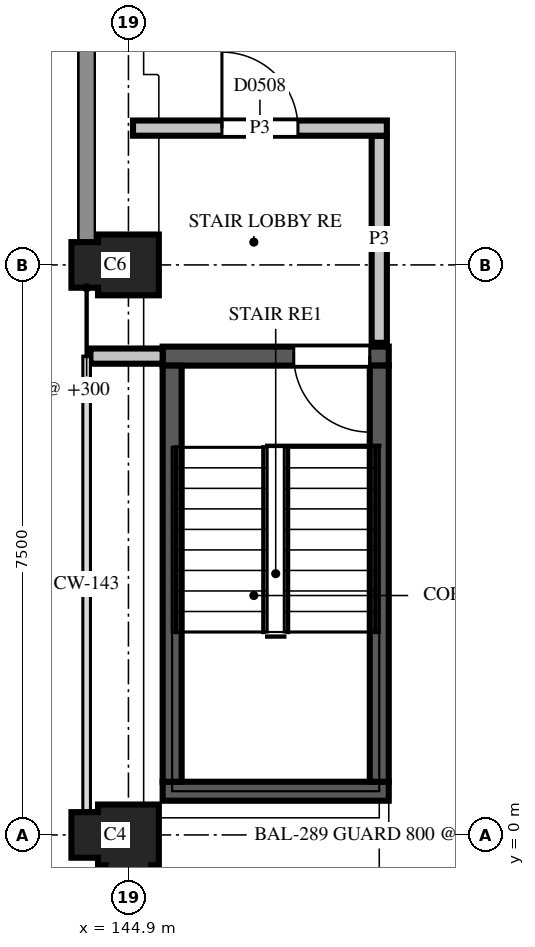
"""IFC4 building model, lengths in metres.
Left out: names, types, materials, properties, quantities, classifications, styles, units other than length and angle.
Written with IfcOpenShell. Run it as: python <this file> out.ifc"""

import sys

from ifc_helpers import new_model, si_unit, direction, frame, frame_2d, origin, place, context, subcontext, project, spatial, polyline, rectangle, outline, extrude, element, fill, save


model = new_model("IFC4")
c1 = context("Model", 3, precision=1e-05, world=origin(), true_north=direction((0.0, 1.0)))
c2 = subcontext(c1, "Body", "Model", "MODEL_VIEW")
j1 = project(units=[si_unit("LENGTHUNIT", "METRE"), si_unit("PLANEANGLEUNIT", "RADIAN")], contexts=[c1])
p1 = place(None, origin())
s1 = spatial("IfcSite", under=j1, at=p1, CompositionType="ELEMENT")
p2 = place(p1, origin())
s2 = spatial("IfcBuilding", under=s1, at=p2, CompositionType="ELEMENT")
p3 = place(p2, frame((0.0, 0.0, 19.3)))
s3 = spatial("IfcBuildingStorey", under=s2, at=p3, CompositionType="ELEMENT", Elevation=19.3)
p4 = place(p3, frame((144.9, 0.0, 0.0), z_axis=(0.0, 0.0, 1.0), x_axis=(-1.0, 0.0, 0.0)))
e1 = element("IfcColumn", 1, at=p4, inside=s3, PredefinedType="COLUMN", context=c2, shape_type="SweptSolid", body=[
    extrude(outline(polyline([(-0.4, -0.4), (0.4, -0.4), (0.4, -0.3), (0.75, -0.3), (0.75, 0.3), (0.4, 0.3), (0.4, 0.4), (0.3, 0.4), (0.3, 0.75), (-0.3, 0.75), (-0.3, 0.4), (-0.4, 0.4), (-0.4, -0.4)])), origin(), (0.0, 0.0, 1.0), 3.7),
])
p5 = place(p3, frame((144.9, 7.5, 0.0), z_axis=(0.0, 0.0, 1.0), x_axis=(-1.0, 0.0, 0.0)))
e2 = element("IfcColumn", 2, at=p5, inside=s3, PredefinedType="COLUMN", context=c2, shape_type="SweptSolid", body=[
    extrude(outline(polyline([(-0.4, -0.4), (0.4, -0.4), (0.4, -0.3), (0.75, -0.3), (0.75, 0.3), (0.4, 0.3), (0.4, 0.4), (-0.4, 0.4), (-0.4, -0.4)])), origin(), (0.0, 0.0, 1.0), 3.7),
])
p6 = place(p3, frame((145.35, 0.575, 0.0), z_axis=(0.0, 0.0, 1.0), x_axis=(1.0, 0.0, 0.0)))
e3 = element("IfcWall", 3, at=p6, inside=s3, PredefinedType="SHEAR", context=c2, shape_type="SweptSolid", body=[
    extrude(rectangle(XDim=2.975, YDim=0.25, at=frame_2d((1.487, 0.0))), origin(), (0.0, 0.0, 1.0), 3.7),
])
p7 = place(p3, frame((145.35, 6.3, 0.0), z_axis=(0.0, 0.0, 1.0), x_axis=(1.0, 0.0, 0.0)))
e4 = element("IfcWall", 4, at=p7, inside=s3, PredefinedType="SHEAR", context=c2, shape_type="SweptSolid", body=[
    extrude(rectangle(XDim=2.975, YDim=0.25, at=frame_2d((1.487, 0.0))), origin(), (0.0, 0.0, 1.0), 3.7),
])
p8 = place(p7, frame((1.725, 0.0, 0.0)))
e5 = element("IfcOpeningElement", 5, at=p8, cuts=e4, PredefinedType="OPENING", context=c2, shape_type="SweptSolid", body=[
    extrude(rectangle(XDim=1.0, YDim=2.1, at=frame_2d((0.5, 1.05))), frame((0.0, 0.135, 0.0), z_axis=(0.0, -1.0, 0.0), x_axis=(1.0, 0.0, 0.0)), (0.0, 0.0, 1.0), 0.27),
])
for number, where, z_axis, x_axis in (
    (6, (145.475, 0.7, 0.0), (0.0, 0.0, 1.0), (0.0, 1.0, 0.0)),
    (7, (148.2, 0.7, 0.0), (0.0, 0.0, 1.0), (0.0, 1.0, 0.0)),
):
    element("IfcWall", number, at=place(p3, frame(where, z_axis=z_axis, x_axis=x_axis)), inside=s3, PredefinedType="SHEAR", context=c2, shape_type="SweptSolid", body=[
        extrude(rectangle(XDim=5.475, YDim=0.25, at=frame_2d((2.738, 0.0))), origin(), (0.0, 0.0, 1.0), 3.7),
    ])
p9 = place(p3, frame((144.4, 6.3, 0.0), z_axis=(0.0, 0.0, 1.0), x_axis=(1.0, 0.0, 0.0)))
e8 = element("IfcWall", 8, at=p9, inside=s3, PredefinedType="PARTITIONING", context=c2, shape_type="SweptSolid", body=[
    extrude(rectangle(XDim=0.95, YDim=0.2, at=frame_2d((0.475, 0.0))), origin(), (0.0, 0.0, 1.0), 2.88),
])
p10 = place(p3, frame((148.2, 6.475, 0.0), z_axis=(0.0, 0.0, 1.0), x_axis=(0.0, 1.0, 0.0)))
e9 = element("IfcWall", 9, at=p10, inside=s3, PredefinedType="PARTITIONING", context=c2, shape_type="SweptSolid", body=[
    extrude(rectangle(XDim=2.725, YDim=0.2, at=frame_2d((1.362, 0.0))), origin(), (0.0, 0.0, 1.0), 2.88),
])
p11 = place(p3, frame((148.3, 9.3, 0.0), z_axis=(0.0, 0.0, 1.0), x_axis=(-1.0, 0.0, 0.0)))
e10 = element("IfcWall", 10, at=p11, inside=s3, PredefinedType="PARTITIONING", context=c2, shape_type="SweptSolid", body=[
    extrude(rectangle(XDim=3.34, YDim=0.2, at=frame_2d((1.67, 0.0))), origin(), (0.0, 0.0, 1.0), 2.88),
])
p12 = place(p11, frame((1.17, 0.0, 0.0)))
e11 = element("IfcOpeningElement", 11, at=p12, cuts=e10, PredefinedType="OPENING", context=c2, shape_type="SweptSolid", body=[
    extrude(rectangle(XDim=1.0, YDim=2.1, at=frame_2d((0.5, 1.05))), frame((0.0, 0.11, 0.0), z_axis=(0.0, -1.0, 0.0), x_axis=(1.0, 0.0, 0.0)), (0.0, 0.0, 1.0), 0.22),
])
p13 = place(p12, origin())
e12 = element("IfcDoor", 12, at=p13, inside=s3, OperationType="SINGLE_SWING_RIGHT", PredefinedType="DOOR", context=c2, shape_type="SweptSolid", body=[
    extrude(rectangle(XDim=1.0, YDim=2.1, at=frame_2d((0.5, 1.05))), frame((0.0, 0.025, 0.0), z_axis=(0.0, -1.0, 0.0), x_axis=(1.0, 0.0, 0.0)), (0.0, 0.0, 1.0), 0.05),
])
fill(e11, e12)
p14 = place(p8, origin())
e13 = element("IfcDoor", 13, at=p14, inside=s3, OperationType="SINGLE_SWING_RIGHT", PredefinedType="DOOR", context=c2, shape_type="SweptSolid", body=[
    extrude(rectangle(XDim=1.0, YDim=2.1, at=frame_2d((0.5, 1.05))), frame((0.0, 0.025, 0.0), z_axis=(0.0, -1.0, 0.0), x_axis=(1.0, 0.0, 0.0)), (0.0, 0.0, 1.0), 0.05),
])
fill(e5, e13)
save(model, sys.argv[1])
